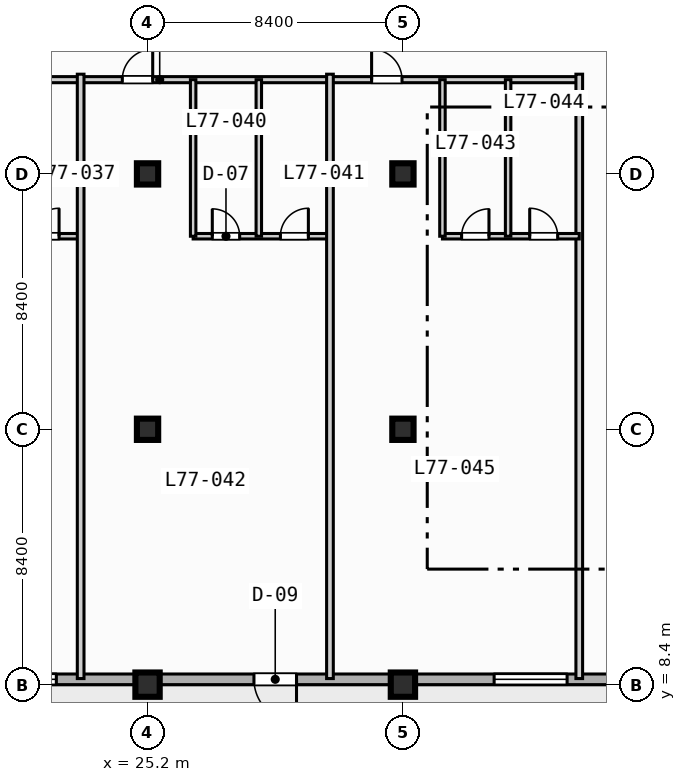
"""IFC4 building model, lengths in metres.
Left out: names, types, materials, properties, quantities, classifications, styles, units other than length and angle.
Written with IfcOpenShell. Run it as: python <this file> out.ifc"""

import sys

from ifc_helpers import new_model, si_unit, direction, frame, frame_2d, origin, origin_2d, place, context, subcontext, project, spatial, rectangle, extrude, element, fill, save


model = new_model("IFC4")
c1 = context("Model", 3, precision=1e-05, world=origin(), true_north=direction((0.0, 1.0)))
c2 = subcontext(c1, "Body", "Model", "MODEL_VIEW")
j1 = project(units=[si_unit("LENGTHUNIT", "METRE"), si_unit("PLANEANGLEUNIT", "RADIAN")], contexts=[c1])
p1 = place(None, origin())
s1 = spatial("IfcSite", under=j1, at=p1, CompositionType="ELEMENT")
p2 = place(p1, origin())
s2 = spatial("IfcBuilding", under=s1, at=p2, CompositionType="ELEMENT")
p3 = place(p2, frame((0.0, 0.0, 312.5)))
s3 = spatial("IfcBuildingStorey", under=s2, at=p3, CompositionType="ELEMENT", Elevation=312.5)
p4 = place(p3, frame((25.2, 8.4, 0.0), z_axis=(0.0, 0.0, 1.0), x_axis=(1.0, 0.0, 0.0)))
e1 = element("IfcColumn", 1, at=p4, inside=s3, PredefinedType="COLUMN", context=c2, shape_type="SweptSolid", body=[
    extrude(rectangle(XDim=0.8, YDim=0.8, at=origin_2d()), origin(), (0.0, 0.0, 1.0), 3.9),
])
for number, where, z_axis, x_axis in (
    (2, (25.2, 16.8, 0.0), (0.0, 0.0, 1.0), (1.0, 0.0, 0.0)),
    (3, (25.2, 25.2, 0.0), (0.0, 0.0, 1.0), (1.0, 0.0, 0.0)),
):
    element("IfcColumn", number, at=place(p3, frame(where, z_axis=z_axis, x_axis=x_axis)), inside=s3, PredefinedType="COLUMN", context=c2, shape_type="SweptSolid", body=[
        extrude(rectangle(XDim=0.7, YDim=0.7, at=origin_2d()), origin(), (0.0, 0.0, 1.0), 3.9),
    ])
p5 = place(p3, frame((33.6, 8.4, 0.0), z_axis=(0.0, 0.0, 1.0), x_axis=(1.0, 0.0, 0.0)))
e4 = element("IfcColumn", 4, at=p5, inside=s3, PredefinedType="COLUMN", context=c2, shape_type="SweptSolid", body=[
    extrude(rectangle(XDim=0.8, YDim=0.8, at=origin_2d()), origin(), (0.0, 0.0, 1.0), 3.9),
])
for number, where, z_axis, x_axis in (
    (5, (33.6, 16.8, 0.0), (0.0, 0.0, 1.0), (1.0, 0.0, 0.0)),
    (6, (33.6, 25.2, 0.0), (0.0, 0.0, 1.0), (1.0, 0.0, 0.0)),
):
    element("IfcColumn", number, at=place(p3, frame(where, z_axis=z_axis, x_axis=x_axis)), inside=s3, PredefinedType="COLUMN", context=c2, shape_type="SweptSolid", body=[
        extrude(rectangle(XDim=0.7, YDim=0.7, at=origin_2d()), origin(), (0.0, 0.0, 1.0), 3.9),
    ])
p6 = place(p3, frame((64.025, 8.575, 0.0), z_axis=(0.0, 0.0, 1.0), x_axis=(-1.0, 0.0, 0.0)))
e7 = element("IfcWall", 7, at=p6, inside=s3, PredefinedType="STANDARD", context=c2, shape_type="SweptSolid", body=[
    extrude(rectangle(XDim=52.45, YDim=0.35, at=frame_2d((26.225, 0.0))), origin(), (0.0, 0.0, 1.0), 3.67),
])
p7 = place(p6, frame((33.925, 0.0, 0.0)))
e8 = element("IfcOpeningElement", 8, at=p7, cuts=e7, PredefinedType="OPENING", context=c2, shape_type="SweptSolid", body=[
    extrude(rectangle(XDim=1.4, YDim=2.2, at=frame_2d((0.7, 1.1))), frame((0.0, 0.185, 0.0), z_axis=(0.0, -1.0, 0.0), x_axis=(1.0, 0.0, 0.0)), (0.0, 0.0, 1.0), 0.37),
])
p8 = place(p6, frame((41.825, 0.0, 0.85)))
e9 = element("IfcOpeningElement", 9, at=p8, cuts=e7, PredefinedType="OPENING", context=c2, shape_type="SweptSolid", body=[
    extrude(rectangle(XDim=2.4, YDim=1.95, at=frame_2d((1.2, 0.975))), frame((0.0, 0.185, 0.0), z_axis=(0.0, -1.0, 0.0), x_axis=(1.0, 0.0, 0.0)), (0.0, 0.0, 1.0), 0.37),
])
p9 = place(p6, frame((25.025, 0.0, 0.85)))
e10 = element("IfcOpeningElement", 10, at=p9, cuts=e7, PredefinedType="OPENING", context=c2, shape_type="SweptSolid", body=[
    extrude(rectangle(XDim=2.4, YDim=1.95, at=frame_2d((1.2, 0.975))), frame((0.0, 0.185, 0.0), z_axis=(0.0, -1.0, 0.0), x_axis=(1.0, 0.0, 0.0)), (0.0, 0.0, 1.0), 0.37),
])
p10 = place(p6, frame((16.925, 0.0, 0.85)))
e11 = element("IfcOpeningElement", 11, at=p10, cuts=e7, PredefinedType="OPENING", context=c2, shape_type="SweptSolid", body=[
    extrude(rectangle(XDim=1.8, YDim=1.8, at=frame_2d((0.9, 0.9))), frame((0.0, 0.185, 0.0), z_axis=(0.0, -1.0, 0.0), x_axis=(1.0, 0.0, 0.0)), (0.0, 0.0, 1.0), 0.37),
])
p11 = place(p6, frame((50.275, 0.0, 0.85)))
e12 = element("IfcOpeningElement", 12, at=p11, cuts=e7, PredefinedType="OPENING", context=c2, shape_type="SweptSolid", body=[
    extrude(rectangle(XDim=1.8, YDim=1.8, at=frame_2d((0.9, 0.9))), frame((0.0, 0.185, 0.0), z_axis=(0.0, -1.0, 0.0), x_axis=(1.0, 0.0, 0.0)), (0.0, 0.0, 1.0), 0.37),
])
p12 = place(p3, frame((11.8, 28.3, 0.0), z_axis=(0.0, 0.0, 1.0), x_axis=(1.0, 0.0, 0.0)))
e13 = element("IfcWall", 13, at=p12, inside=s3, PredefinedType="PARTITIONING", context=c2, shape_type="SweptSolid", body=[
    extrude(rectangle(XDim=27.6, YDim=0.2, at=frame_2d((13.8, 0.0))), origin(), (0.0, 0.0, 1.0), 3.67),
])
p13 = place(p12, frame((3.92, 0.0, 0.0)))
e14 = element("IfcOpeningElement", 14, at=p13, cuts=e13, PredefinedType="OPENING", context=c2, shape_type="SweptSolid", body=[
    extrude(rectangle(XDim=1.0, YDim=2.15, at=frame_2d((0.5, 1.075))), frame((0.0, 0.11, 0.0), z_axis=(0.0, -1.0, 0.0), x_axis=(1.0, 0.0, 0.0)), (0.0, 0.0, 1.0), 0.22),
])
p14 = place(p12, frame((12.57, 0.0, 0.0)))
e15 = element("IfcOpeningElement", 15, at=p14, cuts=e13, PredefinedType="OPENING", context=c2, shape_type="SweptSolid", body=[
    extrude(rectangle(XDim=1.0, YDim=2.15, at=frame_2d((0.5, 1.075))), frame((0.0, 0.11, 0.0), z_axis=(0.0, -1.0, 0.0), x_axis=(1.0, 0.0, 0.0)), (0.0, 0.0, 1.0), 0.22),
])
p15 = place(p12, frame((20.77, 0.0, 0.0)))
e16 = element("IfcOpeningElement", 16, at=p15, cuts=e13, PredefinedType="OPENING", context=c2, shape_type="SweptSolid", body=[
    extrude(rectangle(XDim=1.0, YDim=2.15, at=frame_2d((0.5, 1.075))), frame((0.0, 0.11, 0.0), z_axis=(0.0, -1.0, 0.0), x_axis=(1.0, 0.0, 0.0)), (0.0, 0.0, 1.0), 0.22),
])
p16 = place(p3, frame((18.5, 23.15, 0.0), z_axis=(0.0, 0.0, 1.0), x_axis=(1.0, 0.0, 0.0)))
e17 = element("IfcWall", 17, at=p16, inside=s3, PredefinedType="PLUMBINGWALL", context=c2, shape_type="SweptSolid", body=[
    extrude(rectangle(XDim=4.5, YDim=0.18, at=frame_2d((2.25, 0.0))), origin(), (0.0, 0.0, 1.0), 3.67),
])
p17 = place(p16, frame((0.63, 0.0, 0.0)))
e18 = element("IfcOpeningElement", 18, at=p17, cuts=e17, PredefinedType="OPENING", context=c2, shape_type="SweptSolid", body=[
    extrude(rectangle(XDim=0.9, YDim=2.1, at=frame_2d((0.45, 1.05))), frame((0.0, 0.1, 0.0), z_axis=(0.0, -1.0, 0.0), x_axis=(1.0, 0.0, 0.0)), (0.0, 0.0, 1.0), 0.2),
])
p18 = place(p16, frame((2.87, 0.0, 0.0)))
e19 = element("IfcOpeningElement", 19, at=p18, cuts=e17, PredefinedType="OPENING", context=c2, shape_type="SweptSolid", body=[
    extrude(rectangle(XDim=0.92, YDim=2.1, at=frame_2d((0.46, 1.05))), frame((0.0, 0.1, 0.0), z_axis=(0.0, -1.0, 0.0), x_axis=(1.0, 0.0, 0.0)), (0.0, 0.0, 1.0), 0.2),
])
p19 = place(p3, frame((23.0, 8.6, 0.0), z_axis=(0.0, 0.0, 1.0), x_axis=(0.0, 1.0, 0.0)))
e20 = element("IfcWall", 20, at=p19, inside=s3, PredefinedType="PARTITIONING", context=c2, shape_type="SweptSolid", body=[
    extrude(rectangle(XDim=19.88, YDim=0.22, at=frame_2d((9.94, 0.0))), origin(), (0.0, 0.0, 1.0), 3.67),
])
p20 = place(p3, frame((26.7, 23.15, 0.0), z_axis=(0.0, 0.0, 1.0), x_axis=(1.0, 0.0, 0.0)))
e21 = element("IfcWall", 21, at=p20, inside=s3, PredefinedType="PLUMBINGWALL", context=c2, shape_type="SweptSolid", body=[
    extrude(rectangle(XDim=4.5, YDim=0.18, at=frame_2d((2.25, 0.0))), origin(), (0.0, 0.0, 1.0), 3.67),
])
p21 = place(p20, frame((0.63, 0.0, 0.0)))
e22 = element("IfcOpeningElement", 22, at=p21, cuts=e21, PredefinedType="OPENING", context=c2, shape_type="SweptSolid", body=[
    extrude(rectangle(XDim=0.9, YDim=2.1, at=frame_2d((0.45, 1.05))), frame((0.0, 0.1, 0.0), z_axis=(0.0, -1.0, 0.0), x_axis=(1.0, 0.0, 0.0)), (0.0, 0.0, 1.0), 0.2),
])
p22 = place(p20, frame((2.87, 0.0, 0.0)))
e23 = element("IfcOpeningElement", 23, at=p22, cuts=e21, PredefinedType="OPENING", context=c2, shape_type="SweptSolid", body=[
    extrude(rectangle(XDim=0.92, YDim=2.1, at=frame_2d((0.46, 1.05))), frame((0.0, 0.1, 0.0), z_axis=(0.0, -1.0, 0.0), x_axis=(1.0, 0.0, 0.0)), (0.0, 0.0, 1.0), 0.2),
])
for number, where, z_axis, x_axis in (
    (24, (26.7, 23.15, 0.0), (0.0, 0.0, 1.0), (0.0, 1.0, 0.0)),
    (25, (28.86, 23.15, 0.0), (0.0, 0.0, 1.0), (0.0, 1.0, 0.0)),
):
    element("IfcWall", number, at=place(p3, frame(where, z_axis=z_axis, x_axis=x_axis)), inside=s3, PredefinedType="PLUMBINGWALL", context=c2, shape_type="SweptSolid", body=[
        extrude(rectangle(XDim=5.15, YDim=0.18, at=frame_2d((2.575, 0.0))), origin(), (0.0, 0.0, 1.0), 3.67),
    ])
for number, where, z_axis, x_axis in (
    (26, (31.2, 8.6, 0.0), (0.0, 0.0, 1.0), (0.0, 1.0, 0.0)),
    (27, (39.4, 8.6, 0.0), (0.0, 0.0, 1.0), (0.0, 1.0, 0.0)),
):
    element("IfcWall", number, at=place(p3, frame(where, z_axis=z_axis, x_axis=x_axis)), inside=s3, PredefinedType="PARTITIONING", context=c2, shape_type="SweptSolid", body=[
        extrude(rectangle(XDim=19.88, YDim=0.22, at=frame_2d((9.94, 0.0))), origin(), (0.0, 0.0, 1.0), 3.67),
    ])
p23 = place(p3, frame((34.9, 23.15, 0.0), z_axis=(0.0, 0.0, 1.0), x_axis=(1.0, 0.0, 0.0)))
e28 = element("IfcWall", 28, at=p23, inside=s3, PredefinedType="PLUMBINGWALL", context=c2, shape_type="SweptSolid", body=[
    extrude(rectangle(XDim=4.5, YDim=0.18, at=frame_2d((2.25, 0.0))), origin(), (0.0, 0.0, 1.0), 3.67),
])
p24 = place(p23, frame((0.63, 0.0, 0.0)))
e29 = element("IfcOpeningElement", 29, at=p24, cuts=e28, PredefinedType="OPENING", context=c2, shape_type="SweptSolid", body=[
    extrude(rectangle(XDim=0.9, YDim=2.1, at=frame_2d((0.45, 1.05))), frame((0.0, 0.1, 0.0), z_axis=(0.0, -1.0, 0.0), x_axis=(1.0, 0.0, 0.0)), (0.0, 0.0, 1.0), 0.2),
])
p25 = place(p23, frame((2.87, 0.0, 0.0)))
e30 = element("IfcOpeningElement", 30, at=p25, cuts=e28, PredefinedType="OPENING", context=c2, shape_type="SweptSolid", body=[
    extrude(rectangle(XDim=0.92, YDim=2.1, at=frame_2d((0.46, 1.05))), frame((0.0, 0.1, 0.0), z_axis=(0.0, -1.0, 0.0), x_axis=(1.0, 0.0, 0.0)), (0.0, 0.0, 1.0), 0.2),
])
for number, where, z_axis, x_axis in (
    (31, (34.9, 23.15, 0.0), (0.0, 0.0, 1.0), (0.0, 1.0, 0.0)),
    (32, (37.06, 23.15, 0.0), (0.0, 0.0, 1.0), (0.0, 1.0, 0.0)),
):
    element("IfcWall", number, at=place(p3, frame(where, z_axis=z_axis, x_axis=x_axis)), inside=s3, PredefinedType="PLUMBINGWALL", context=c2, shape_type="SweptSolid", body=[
        extrude(rectangle(XDim=5.15, YDim=0.18, at=frame_2d((2.575, 0.0))), origin(), (0.0, 0.0, 1.0), 3.67),
    ])
p26 = place(p7, origin())
e33 = element("IfcDoor", 33, at=p26, inside=s3, OperationType="SINGLE_SWING_LEFT", PredefinedType="DOOR", context=c2, shape_type="SweptSolid", body=[
    extrude(rectangle(XDim=1.4, YDim=2.2, at=frame_2d((0.7, 1.1))), frame((0.0, 0.025, 0.0), z_axis=(0.0, -1.0, 0.0), x_axis=(1.0, 0.0, 0.0)), (0.0, 0.0, 1.0), 0.05),
])
fill(e8, e33)
p27 = place(p8, origin())
e34 = element("IfcWindow", 34, at=p27, inside=s3, PartitioningType="SINGLE_PANEL", PredefinedType="WINDOW", context=c2, shape_type="SweptSolid", body=[
    extrude(rectangle(XDim=2.4, YDim=1.95, at=frame_2d((1.2, 0.975))), frame((0.0, 0.03, 0.0), z_axis=(0.0, -1.0, 0.0), x_axis=(1.0, 0.0, 0.0)), (0.0, 0.0, 1.0), 0.06),
])
fill(e9, e34)
p28 = place(p9, origin())
e35 = element("IfcWindow", 35, at=p28, inside=s3, PartitioningType="SINGLE_PANEL", PredefinedType="WINDOW", context=c2, shape_type="SweptSolid", body=[
    extrude(rectangle(XDim=2.4, YDim=1.95, at=frame_2d((1.2, 0.975))), frame((0.0, 0.03, 0.0), z_axis=(0.0, -1.0, 0.0), x_axis=(1.0, 0.0, 0.0)), (0.0, 0.0, 1.0), 0.06),
])
fill(e10, e35)
p29 = place(p14, origin())
e36 = element("IfcDoor", 36, at=p29, inside=s3, OperationType="SINGLE_SWING_RIGHT", PredefinedType="DOOR", context=c2, shape_type="SweptSolid", body=[
    extrude(rectangle(XDim=1.0, YDim=2.15, at=frame_2d((0.5, 1.075))), frame((0.0, 0.025, 0.0), z_axis=(0.0, -1.0, 0.0), x_axis=(1.0, 0.0, 0.0)), (0.0, 0.0, 1.0), 0.05),
])
fill(e15, e36)
p30 = place(p15, origin())
e37 = element("IfcDoor", 37, at=p30, inside=s3, OperationType="SINGLE_SWING_LEFT", PredefinedType="DOOR", context=c2, shape_type="SweptSolid", body=[
    extrude(rectangle(XDim=1.0, YDim=2.15, at=frame_2d((0.5, 1.075))), frame((0.0, 0.025, 0.0), z_axis=(0.0, -1.0, 0.0), x_axis=(1.0, 0.0, 0.0)), (0.0, 0.0, 1.0), 0.05),
])
fill(e16, e37)
p31 = place(p18, origin())
e38 = element("IfcDoor", 38, at=p31, inside=s3, OperationType="SINGLE_SWING_RIGHT", PredefinedType="DOOR", context=c2, shape_type="SweptSolid", body=[
    extrude(rectangle(XDim=0.92, YDim=2.1, at=frame_2d((0.46, 1.05))), frame((0.0, 0.025, 0.0), z_axis=(0.0, -1.0, 0.0), x_axis=(1.0, 0.0, 0.0)), (0.0, 0.0, 1.0), 0.05),
])
fill(e19, e38)
p32 = place(p21, origin())
e39 = element("IfcDoor", 39, at=p32, inside=s3, OperationType="SINGLE_SWING_LEFT", PredefinedType="DOOR", context=c2, shape_type="SweptSolid", body=[
    extrude(rectangle(XDim=0.9, YDim=2.1, at=frame_2d((0.45, 1.05))), frame((0.0, 0.025, 0.0), z_axis=(0.0, -1.0, 0.0), x_axis=(1.0, 0.0, 0.0)), (0.0, 0.0, 1.0), 0.05),
])
fill(e22, e39)
p33 = place(p22, origin())
e40 = element("IfcDoor", 40, at=p33, inside=s3, OperationType="SINGLE_SWING_RIGHT", PredefinedType="DOOR", context=c2, shape_type="SweptSolid", body=[
    extrude(rectangle(XDim=0.92, YDim=2.1, at=frame_2d((0.46, 1.05))), frame((0.0, 0.025, 0.0), z_axis=(0.0, -1.0, 0.0), x_axis=(1.0, 0.0, 0.0)), (0.0, 0.0, 1.0), 0.05),
])
fill(e23, e40)
p34 = place(p24, origin())
e41 = element("IfcDoor", 41, at=p34, inside=s3, OperationType="SINGLE_SWING_RIGHT", PredefinedType="DOOR", context=c2, shape_type="SweptSolid", body=[
    extrude(rectangle(XDim=0.9, YDim=2.1, at=frame_2d((0.45, 1.05))), frame((0.0, 0.025, 0.0), z_axis=(0.0, -1.0, 0.0), x_axis=(1.0, 0.0, 0.0)), (0.0, 0.0, 1.0), 0.05),
])
fill(e29, e41)
p35 = place(p25, origin())
e42 = element("IfcDoor", 42, at=p35, inside=s3, OperationType="SINGLE_SWING_LEFT", PredefinedType="DOOR", context=c2, shape_type="SweptSolid", body=[
    extrude(rectangle(XDim=0.92, YDim=2.1, at=frame_2d((0.46, 1.05))), frame((0.0, 0.025, 0.0), z_axis=(0.0, -1.0, 0.0), x_axis=(1.0, 0.0, 0.0)), (0.0, 0.0, 1.0), 0.05),
])
fill(e30, e42)
save(model, sys.argv[1])
